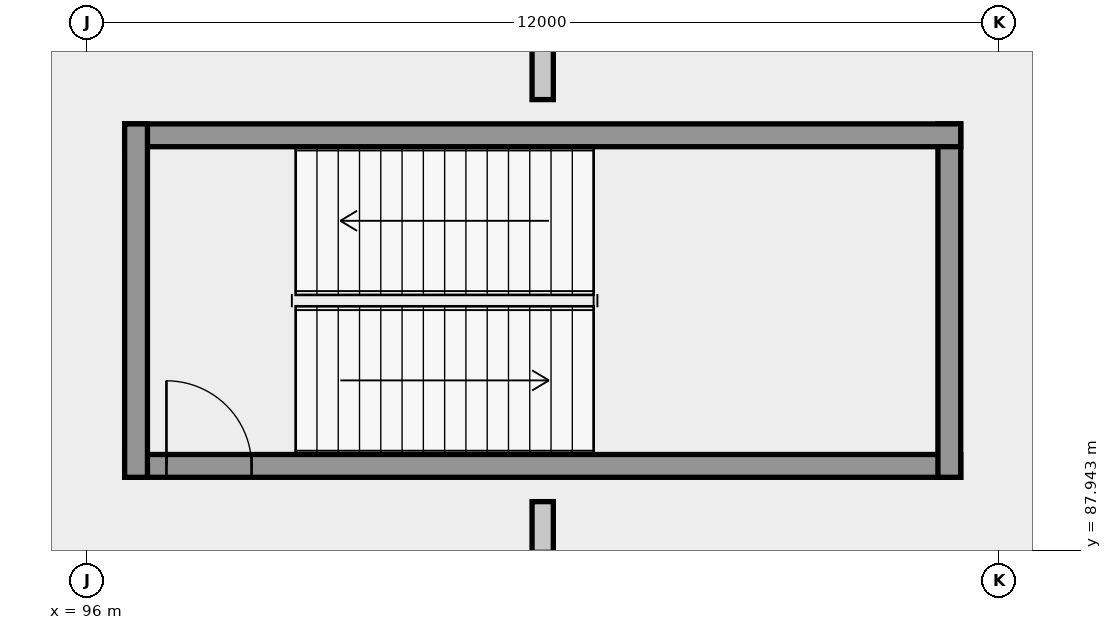
"""IFC4 building model, lengths in metres.
Left out: names, types, materials, properties, quantities, classifications, styles, units other than length and angle.
Written with IfcOpenShell. Run it as: python <this file> out.ifc"""

import sys

from ifc_helpers import new_model, si_unit, direction, frame, frame_2d, origin, place, context, subcontext, project, spatial, rectangle, extrude, element, fill, save


model = new_model("IFC4")
c1 = context("Model", 3, precision=1e-05, world=origin(), true_north=direction((0.0, 1.0)))
c2 = subcontext(c1, "Body", "Model", "MODEL_VIEW")
j1 = project(units=[si_unit("LENGTHUNIT", "METRE"), si_unit("PLANEANGLEUNIT", "RADIAN")], contexts=[c1])
p1 = place(None, origin())
s1 = spatial("IfcSite", under=j1, at=p1, CompositionType="ELEMENT")
p2 = place(p1, origin())
s2 = spatial("IfcBuilding", under=s1, at=p2, CompositionType="ELEMENT")
p3 = place(p2, frame((0.0, 0.0, -5.4)))
s3 = spatial("IfcBuildingStorey", under=s2, at=p3, CompositionType="ELEMENT", Elevation=-5.4)
p4 = place(p3, frame((96.5, 89.05, 0.0), z_axis=(0.0, 0.0, 1.0), x_axis=(1.0, 0.0, 0.0)))
e1 = element("IfcWall", 1, at=p4, inside=s3, PredefinedType="SHEAR", context=c2, shape_type="SweptSolid", body=[
    extrude(rectangle(XDim=11.0, YDim=0.3, at=frame_2d((5.5, 0.0))), origin(), (0.0, 0.0, 1.0), 5.12),
])
p5 = place(p4, frame((0.55, 0.0, 0.0)))
e2 = element("IfcOpeningElement", 2, at=p5, cuts=e1, PredefinedType="OPENING", context=c2, shape_type="SweptSolid", body=[
    extrude(rectangle(XDim=1.12, YDim=2.2, at=frame_2d((0.56, 1.1))), frame((0.0, 0.16, 0.0), z_axis=(0.0, -1.0, 0.0), x_axis=(1.0, 0.0, 0.0)), (0.0, 0.0, 1.0), 0.32),
])
p6 = place(p3, frame((107.35, 88.9, 0.0), z_axis=(0.0, 0.0, 1.0), x_axis=(0.0, 1.0, 0.0)))
e3 = element("IfcWall", 3, at=p6, inside=s3, PredefinedType="SHEAR", context=c2, shape_type="SweptSolid", body=[
    extrude(rectangle(XDim=4.65, YDim=0.3, at=frame_2d((2.325, 0.0))), origin(), (0.0, 0.0, 1.0), 5.12),
])
p7 = place(p3, frame((107.5, 93.4, 0.0), z_axis=(0.0, 0.0, 1.0), x_axis=(-1.0, 0.0, 0.0)))
e4 = element("IfcWall", 4, at=p7, inside=s3, PredefinedType="SHEAR", context=c2, shape_type="SweptSolid", body=[
    extrude(rectangle(XDim=11.0, YDim=0.3, at=frame_2d((5.5, 0.0))), origin(), (0.0, 0.0, 1.0), 5.12),
])
p8 = place(p3, frame((96.65, 93.55, 0.0), z_axis=(0.0, 0.0, 1.0), x_axis=(0.0, -1.0, 0.0)))
e5 = element("IfcWall", 5, at=p8, inside=s3, PredefinedType="SHEAR", context=c2, shape_type="SweptSolid", body=[
    extrude(rectangle(XDim=4.65, YDim=0.3, at=frame_2d((2.325, 0.0))), origin(), (0.0, 0.0, 1.0), 5.12),
])
p9 = place(p3, frame((102.0, 84.33, 0.0), z_axis=(0.0, 0.0, 1.0), x_axis=(0.0, 1.0, 0.0)))
e6 = element("IfcWall", 6, at=p9, inside=s3, PredefinedType="SOLIDWALL", context=c2, shape_type="SweptSolid", body=[
    extrude(rectangle(XDim=4.25, YDim=0.28, at=frame_2d((2.125, 0.0))), origin(), (0.0, 0.0, 1.0), 5.1),
])
p10 = place(p9, frame((1.8, 0.0, 0.0)))
e7 = element("IfcOpeningElement", 7, at=p10, cuts=e6, PredefinedType="OPENING", context=c2, shape_type="SweptSolid", body=[
    extrude(rectangle(XDim=1.8, YDim=2.4, at=frame_2d((0.9, 1.2))), frame((0.0, 0.15, 0.0), z_axis=(0.0, -1.0, 0.0), x_axis=(1.0, 0.0, 0.0)), (0.0, 0.0, 1.0), 0.3),
])
p11 = place(p3, frame((102.0, 93.87, 0.0), z_axis=(0.0, 0.0, 1.0), x_axis=(0.0, 1.0, 0.0)))
e8 = element("IfcWall", 8, at=p11, inside=s3, PredefinedType="SOLIDWALL", context=c2, shape_type="SweptSolid", body=[
    extrude(rectangle(XDim=1.8, YDim=0.28, at=frame_2d((0.9, 0.0))), origin(), (0.0, 0.0, 1.0), 5.1),
])
p12 = place(p5, origin())
e9 = element("IfcDoor", 9, at=p12, inside=s3, OperationType="SINGLE_SWING_LEFT", PredefinedType="DOOR", context=c2, shape_type="SweptSolid", body=[
    extrude(rectangle(XDim=1.12, YDim=2.2, at=frame_2d((0.56, 1.1))), frame((0.0, 0.025, 0.0), z_axis=(0.0, -1.0, 0.0), x_axis=(1.0, 0.0, 0.0)), (0.0, 0.0, 1.0), 0.05),
])
fill(e2, e9)
save(model, sys.argv[1])
